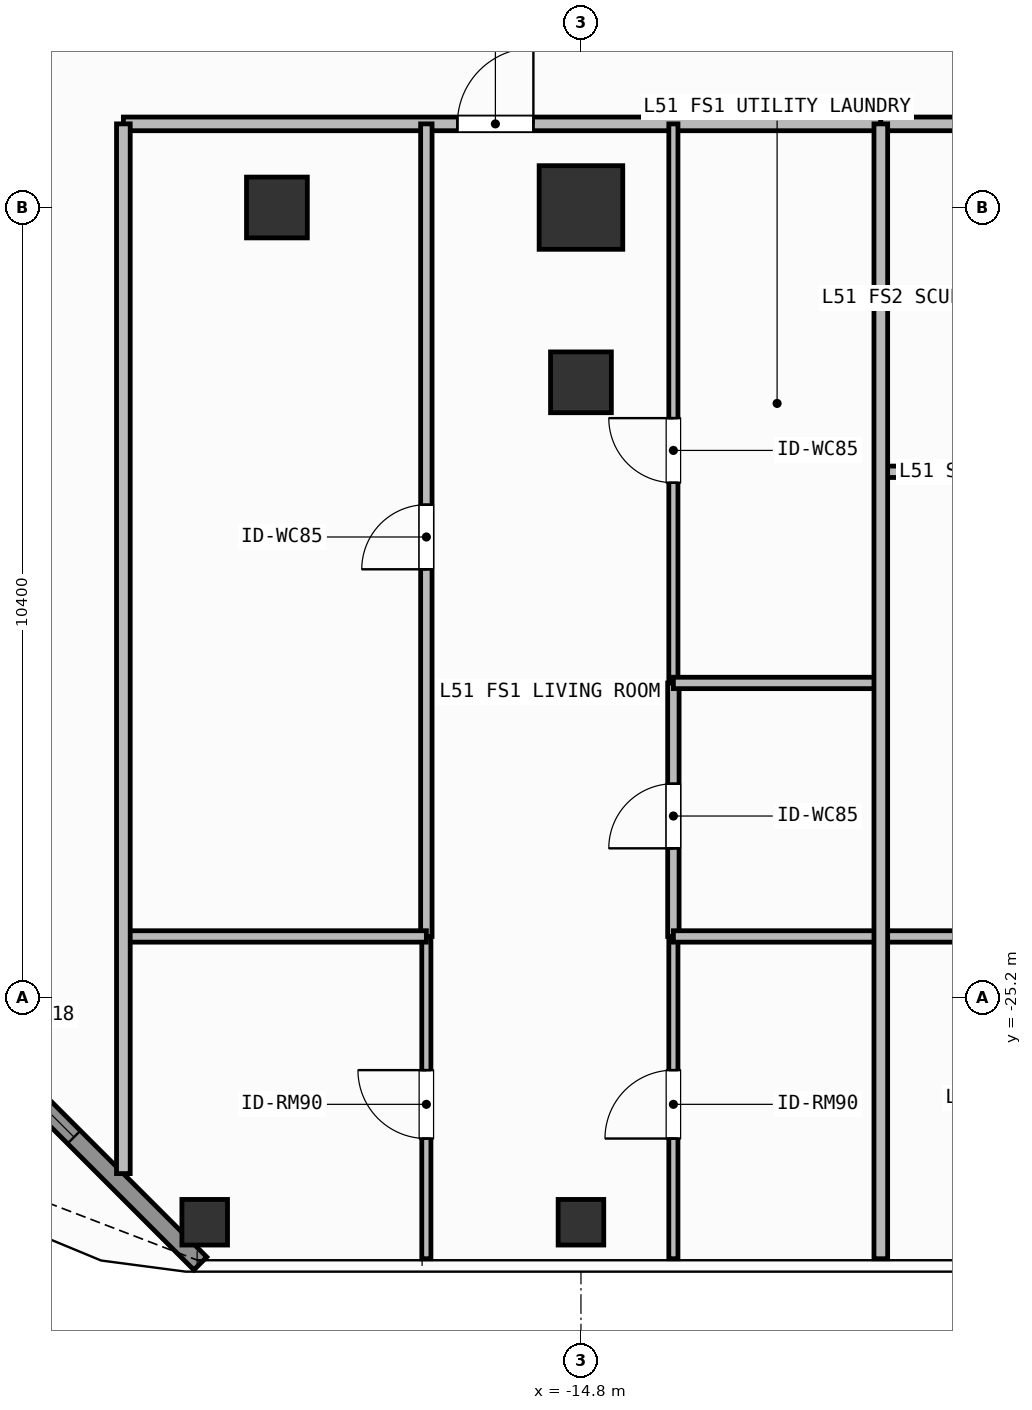
"""IFC4 building model, lengths in metres.
Left out: names, types, materials, properties, quantities, classifications, styles, units other than length and angle.
Written with IfcOpenShell. Run it as: python <this file> out.ifc"""

import sys

from ifc_helpers import new_model, si_unit, direction, frame, frame_2d, origin, origin_2d, place, context, subcontext, project, spatial, rectangle, hollow_rectangle, extrude, element, fill, save


model = new_model("IFC4")
c1 = context("Model", 3, precision=1e-05, world=origin(), true_north=direction((0.0, 1.0)))
c2 = subcontext(c1, "Body", "Model", "MODEL_VIEW")
j1 = project(units=[si_unit("LENGTHUNIT", "METRE"), si_unit("PLANEANGLEUNIT", "RADIAN")], contexts=[c1])
p1 = place(None, origin())
s1 = spatial("IfcSite", under=j1, at=p1, CompositionType="ELEMENT")
p2 = place(p1, origin())
s2 = spatial("IfcBuilding", under=s1, at=p2, CompositionType="ELEMENT")
p3 = place(p2, frame((0.0, 0.0, 207.0)))
s3 = spatial("IfcBuildingStorey", under=s2, at=p3, CompositionType="ELEMENT", Elevation=207.0)
p4 = place(p3, frame((-14.8, -14.8, 0.0), z_axis=(0.0, 0.0, 1.0), x_axis=(1.0, 0.0, 0.0)))
e1 = element("IfcColumn", 1, at=p4, inside=s3, PredefinedType="COLUMN", context=c2, shape_type="SweptSolid", body=[
    extrude(rectangle(XDim=1.1, YDim=1.1, at=origin_2d()), origin(), (0.0, 0.0, 1.0), 3.9),
])
for number, where, z_axis, x_axis in (
    (2, (-18.8, -14.8, 0.0), (0.0, 0.0, 1.0), (1.0, 0.0, 0.0)),
    (3, (-14.8, -17.1, 0.0), (0.0, 0.0, 1.0), (1.0, 0.0, 0.0)),
):
    element("IfcColumn", number, at=place(p3, frame(where, z_axis=z_axis, x_axis=x_axis)), inside=s3, PredefinedType="COLUMN", context=c2, shape_type="SweptSolid", body=[
        extrude(hollow_rectangle(XDim=0.8, YDim=0.8, WallThickness=0.036, at=origin_2d()), origin(), (0.0, 0.0, 1.0), 3.9),
    ])
for number, where, z_axis, x_axis in (
    (4, (-19.75, -28.15, 0.0), (0.0, 0.0, 1.0), (1.0, 0.0, 0.0)),
    (5, (-14.8, -28.15, 0.0), (0.0, 0.0, 1.0), (1.0, 0.0, 0.0)),
):
    element("IfcColumn", number, at=place(p3, frame(where, z_axis=z_axis, x_axis=x_axis)), inside=s3, PredefinedType="COLUMN", context=c2, shape_type="SweptSolid", body=[
        extrude(hollow_rectangle(XDim=0.6, YDim=0.6, WallThickness=0.028, at=origin_2d()), origin(), (0.0, 0.0, 1.0), 3.9),
    ])
p5 = place(p3, frame((-19.808, -28.692, 0.0), z_axis=(0.0, 0.0, 1.0), x_axis=(-0.707106781187, 0.707106781187, 0.0)))
e6 = element("IfcWall", 6, at=p5, inside=s3, PredefinedType="SOLIDWALL", context=c2, shape_type="SweptSolid", body=[
    extrude(rectangle(XDim=6.201, YDim=0.24, at=frame_2d((3.101, 0.0))), origin(), (0.0, 0.0, 1.0), 3.62),
])
p6 = place(p5, frame((2.351, 0.0, 0.8)))
e7 = element("IfcOpeningElement", 7, at=p6, cuts=e6, PredefinedType="OPENING", context=c2, shape_type="SweptSolid", body=[
    extrude(rectangle(XDim=1.5, YDim=1.85, at=frame_2d((0.75, 0.925))), frame((0.0, 0.13, 0.0), z_axis=(0.0, -1.0, 0.0), x_axis=(1.0, 0.0, 0.0)), (0.0, 0.0, 1.0), 0.26),
])
p7 = place(p3, frame((-20.82, -13.7, 0.0), z_axis=(0.0, 0.0, 1.0), x_axis=(1.0, 0.0, 0.0)))
e8 = element("IfcWall", 8, at=p7, inside=s3, PredefinedType="PARTITIONING", context=c2, shape_type="SweptSolid", body=[
    extrude(rectangle(XDim=9.965, YDim=0.18, at=frame_2d((4.982, 0.0))), origin(), (0.0, 0.0, 1.0), 3.62),
])
p8 = place(p7, frame((4.394, 0.0, 0.0)))
e9 = element("IfcOpeningElement", 9, at=p8, cuts=e8, PredefinedType="OPENING", context=c2, shape_type="SweptSolid", body=[
    extrude(rectangle(XDim=1.0, YDim=2.2, at=frame_2d((0.5, 1.1))), frame((0.0, 0.1, 0.0), z_axis=(0.0, -1.0, 0.0), x_axis=(1.0, 0.0, 0.0)), (0.0, 0.0, 1.0), 0.2),
])
p9 = place(p3, frame((-16.834, -24.39, 0.0), z_axis=(0.0, 0.0, 1.0), x_axis=(0.0, 1.0, 0.0)))
e10 = element("IfcWall", 10, at=p9, inside=s3, PredefinedType="PARTITIONING", context=c2, shape_type="SweptSolid", body=[
    extrude(rectangle(XDim=10.69, YDim=0.15, at=frame_2d((5.345, 0.0))), origin(), (0.0, 0.0, 1.0), 3.62),
])
p10 = place(p9, frame((4.83, 0.0, 0.0)))
e11 = element("IfcOpeningElement", 11, at=p10, cuts=e10, PredefinedType="OPENING", context=c2, shape_type="SweptSolid", body=[
    extrude(rectangle(XDim=0.85, YDim=2.1, at=frame_2d((0.425, 1.05))), frame((0.0, 0.085, 0.0), z_axis=(0.0, -1.0, 0.0), x_axis=(1.0, 0.0, 0.0)), (0.0, 0.0, 1.0), 0.17),
])
p11 = place(p3, frame((-16.834, -28.63, 0.0), z_axis=(0.0, 0.0, 1.0), x_axis=(0.0, 1.0, 0.0)))
e12 = element("IfcWall", 12, at=p11, inside=s3, PredefinedType="PARTITIONING", context=c2, shape_type="SweptSolid", body=[
    extrude(rectangle(XDim=4.24, YDim=0.12, at=frame_2d((2.12, 0.0))), origin(), (0.0, 0.0, 1.0), 3.62),
])
p12 = place(p11, frame((1.581, 0.0, 0.0)))
e13 = element("IfcOpeningElement", 13, at=p12, cuts=e12, PredefinedType="OPENING", context=c2, shape_type="SweptSolid", body=[
    extrude(rectangle(XDim=0.9, YDim=2.1, at=frame_2d((0.45, 1.05))), frame((0.0, 0.07, 0.0), z_axis=(0.0, -1.0, 0.0), x_axis=(1.0, 0.0, 0.0)), (0.0, 0.0, 1.0), 0.14),
])
p13 = place(p3, frame((-13.584, -24.39, 0.0), z_axis=(0.0, 0.0, 1.0), x_axis=(0.0, 1.0, 0.0)))
e14 = element("IfcWall", 14, at=p13, inside=s3, PredefinedType="PARTITIONING", context=c2, shape_type="SweptSolid", body=[
    extrude(rectangle(XDim=3.335, YDim=0.15, at=frame_2d((1.667, 0.0))), origin(), (0.0, 0.0, 1.0), 3.62),
])
p14 = place(p13, frame((1.159, 0.0, 0.0)))
e15 = element("IfcOpeningElement", 15, at=p14, cuts=e14, PredefinedType="OPENING", context=c2, shape_type="SweptSolid", body=[
    extrude(rectangle(XDim=0.85, YDim=2.1, at=frame_2d((0.425, 1.05))), frame((0.0, 0.085, 0.0), z_axis=(0.0, -1.0, 0.0), x_axis=(1.0, 0.0, 0.0)), (0.0, 0.0, 1.0), 0.17),
])
p15 = place(p3, frame((-13.584, -21.055, 0.0), z_axis=(0.0, 0.0, 1.0), x_axis=(0.0, 1.0, 0.0)))
e16 = element("IfcWall", 16, at=p15, inside=s3, PredefinedType="PARTITIONING", context=c2, shape_type="SweptSolid", body=[
    extrude(rectangle(XDim=7.355, YDim=0.12, at=frame_2d((3.677, 0.0))), origin(), (0.0, 0.0, 1.0), 3.62),
])
p16 = place(p15, frame((2.634, 0.0, 0.0)))
e17 = element("IfcOpeningElement", 17, at=p16, cuts=e16, PredefinedType="OPENING", context=c2, shape_type="SweptSolid", body=[
    extrude(rectangle(XDim=0.85, YDim=2.1, at=frame_2d((0.425, 1.05))), frame((0.0, 0.07, 0.0), z_axis=(0.0, -1.0, 0.0), x_axis=(1.0, 0.0, 0.0)), (0.0, 0.0, 1.0), 0.14),
])
p17 = place(p3, frame((-13.584, -28.63, 0.0), z_axis=(0.0, 0.0, 1.0), x_axis=(0.0, 1.0, 0.0)))
e18 = element("IfcWall", 18, at=p17, inside=s3, PredefinedType="PARTITIONING", context=c2, shape_type="SweptSolid", body=[
    extrude(rectangle(XDim=4.24, YDim=0.12, at=frame_2d((2.12, 0.0))), origin(), (0.0, 0.0, 1.0), 3.62),
])
p18 = place(p17, frame((1.581, 0.0, 0.0)))
e19 = element("IfcOpeningElement", 19, at=p18, cuts=e18, PredefinedType="OPENING", context=c2, shape_type="SweptSolid", body=[
    extrude(rectangle(XDim=0.9, YDim=2.1, at=frame_2d((0.45, 1.05))), frame((0.0, 0.07, 0.0), z_axis=(0.0, -1.0, 0.0), x_axis=(1.0, 0.0, 0.0)), (0.0, 0.0, 1.0), 0.14),
])
p19 = place(p3, frame((-10.855, -13.7, 0.0), z_axis=(0.0, 0.0, 1.0), x_axis=(1.0, 0.0, 0.0)))
e20 = element("IfcWall", 20, at=p19, inside=s3, PredefinedType="PARTITIONING", context=c2, shape_type="SweptSolid", body=[
    extrude(rectangle(XDim=16.454, YDim=0.18, at=frame_2d((8.227, 0.0))), origin(), (0.0, 0.0, 1.0), 3.62),
])
p20 = place(p19, frame((8.528, 0.0, 0.0)))
e21 = element("IfcOpeningElement", 21, at=p20, cuts=e20, PredefinedType="OPENING", context=c2, shape_type="SweptSolid", body=[
    extrude(rectangle(XDim=1.0, YDim=2.2, at=frame_2d((0.5, 1.1))), frame((0.0, 0.1, 0.0), z_axis=(0.0, -1.0, 0.0), x_axis=(1.0, 0.0, 0.0)), (0.0, 0.0, 1.0), 0.2),
])
p21 = place(p3, frame((-20.82, -24.39, 0.0), z_axis=(0.0, 0.0, 1.0), x_axis=(1.0, 0.0, 0.0)))
e22 = element("IfcWall", 22, at=p21, inside=s3, PredefinedType="PARTITIONING", context=c2, shape_type="SweptSolid", body=[
    extrude(rectangle(XDim=3.986, YDim=0.15, at=frame_2d((1.993, 0.0))), origin(), (0.0, 0.0, 1.0), 3.62),
])
for number, where, z_axis, x_axis in (
    (23, (-13.584, -21.055, 0.0), (0.0, 0.0, 1.0), (1.0, 0.0, 0.0)),
    (24, (-13.584, -24.39, 0.0), (0.0, 0.0, 1.0), (1.0, 0.0, 0.0)),
):
    element("IfcWall", number, at=place(p3, frame(where, z_axis=z_axis, x_axis=x_axis)), inside=s3, PredefinedType="PARTITIONING", context=c2, shape_type="SweptSolid", body=[
        extrude(rectangle(XDim=2.729, YDim=0.15, at=frame_2d((1.365, 0.0))), origin(), (0.0, 0.0, 1.0), 3.62),
    ])
for number, where, z_axis, x_axis in (
    (25, (-10.855, -18.277, 0.0), (0.0, 0.0, 1.0), (1.0, 0.0, 0.0)),
    (26, (-10.855, -24.39, 0.0), (0.0, 0.0, 1.0), (1.0, 0.0, 0.0)),
):
    element("IfcWall", number, at=place(p3, frame(where, z_axis=z_axis, x_axis=x_axis)), inside=s3, PredefinedType="PARTITIONING", context=c2, shape_type="SweptSolid", body=[
        extrude(rectangle(XDim=5.562, YDim=0.15, at=frame_2d((2.781, 0.0))), origin(), (0.0, 0.0, 1.0), 3.62),
    ])
p22 = place(p3, frame((-10.855, -28.63, 0.0), z_axis=(0.0, 0.0, 1.0), x_axis=(0.0, 1.0, 0.0)))
e27 = element("IfcWall", 27, at=p22, inside=s3, PredefinedType="PARTITIONING", context=c2, shape_type="SweptSolid", body=[
    extrude(rectangle(XDim=14.93, YDim=0.18, at=frame_2d((7.465, 0.0))), origin(), (0.0, 0.0, 1.0), 3.62),
])
p23 = place(p3, frame((-20.82, -27.51, 0.0), z_axis=(0.0, 0.0, 1.0), x_axis=(0.0, 1.0, 0.0)))
e28 = element("IfcWall", 28, at=p23, inside=s3, PredefinedType="PARTITIONING", context=c2, shape_type="SweptSolid", body=[
    extrude(rectangle(XDim=13.81, YDim=0.18, at=frame_2d((6.905, 0.0))), origin(), (0.0, 0.0, 1.0), 3.62),
])
p24 = place(p6, origin())
e29 = element("IfcWindow", 29, at=p24, inside=s3, PartitioningType="SINGLE_PANEL", PredefinedType="WINDOW", context=c2, shape_type="SweptSolid", body=[
    extrude(rectangle(XDim=1.5, YDim=1.85, at=frame_2d((0.75, 0.925))), frame((0.0, 0.03, 0.0), z_axis=(0.0, -1.0, 0.0), x_axis=(1.0, 0.0, 0.0)), (0.0, 0.0, 1.0), 0.06),
])
fill(e7, e29)
p25 = place(p8, origin())
e30 = element("IfcDoor", 30, at=p25, inside=s3, OperationType="SINGLE_SWING_RIGHT", PredefinedType="DOOR", context=c2, shape_type="SweptSolid", body=[
    extrude(rectangle(XDim=1.0, YDim=2.2, at=frame_2d((0.5, 1.1))), frame((0.0, 0.025, 0.0), z_axis=(0.0, -1.0, 0.0), x_axis=(1.0, 0.0, 0.0)), (0.0, 0.0, 1.0), 0.05),
])
fill(e9, e30)
p26 = place(p10, origin())
e31 = element("IfcDoor", 31, at=p26, inside=s3, OperationType="SINGLE_SWING_LEFT", PredefinedType="DOOR", context=c2, shape_type="SweptSolid", body=[
    extrude(rectangle(XDim=0.85, YDim=2.1, at=frame_2d((0.425, 1.05))), frame((0.0, 0.025, 0.0), z_axis=(0.0, -1.0, 0.0), x_axis=(1.0, 0.0, 0.0)), (0.0, 0.0, 1.0), 0.05),
])
fill(e11, e31)
p27 = place(p12, origin())
e32 = element("IfcDoor", 32, at=p27, inside=s3, OperationType="SINGLE_SWING_RIGHT", PredefinedType="DOOR", context=c2, shape_type="SweptSolid", body=[
    extrude(rectangle(XDim=0.9, YDim=2.1, at=frame_2d((0.45, 1.05))), frame((0.0, 0.025, 0.0), z_axis=(0.0, -1.0, 0.0), x_axis=(1.0, 0.0, 0.0)), (0.0, 0.0, 1.0), 0.05),
])
fill(e13, e32)
p28 = place(p14, origin())
e33 = element("IfcDoor", 33, at=p28, inside=s3, OperationType="SINGLE_SWING_LEFT", PredefinedType="DOOR", context=c2, shape_type="SweptSolid", body=[
    extrude(rectangle(XDim=0.85, YDim=2.1, at=frame_2d((0.425, 1.05))), frame((0.0, 0.025, 0.0), z_axis=(0.0, -1.0, 0.0), x_axis=(1.0, 0.0, 0.0)), (0.0, 0.0, 1.0), 0.05),
])
fill(e15, e33)
p29 = place(p16, origin())
e34 = element("IfcDoor", 34, at=p29, inside=s3, OperationType="SINGLE_SWING_RIGHT", PredefinedType="DOOR", context=c2, shape_type="SweptSolid", body=[
    extrude(rectangle(XDim=0.85, YDim=2.1, at=frame_2d((0.425, 1.05))), frame((0.0, 0.025, 0.0), z_axis=(0.0, -1.0, 0.0), x_axis=(1.0, 0.0, 0.0)), (0.0, 0.0, 1.0), 0.05),
])
fill(e17, e34)
p30 = place(p18, origin())
e35 = element("IfcDoor", 35, at=p30, inside=s3, OperationType="SINGLE_SWING_LEFT", PredefinedType="DOOR", context=c2, shape_type="SweptSolid", body=[
    extrude(rectangle(XDim=0.9, YDim=2.1, at=frame_2d((0.45, 1.05))), frame((0.0, 0.025, 0.0), z_axis=(0.0, -1.0, 0.0), x_axis=(1.0, 0.0, 0.0)), (0.0, 0.0, 1.0), 0.05),
])
fill(e19, e35)
save(model, sys.argv[1])
